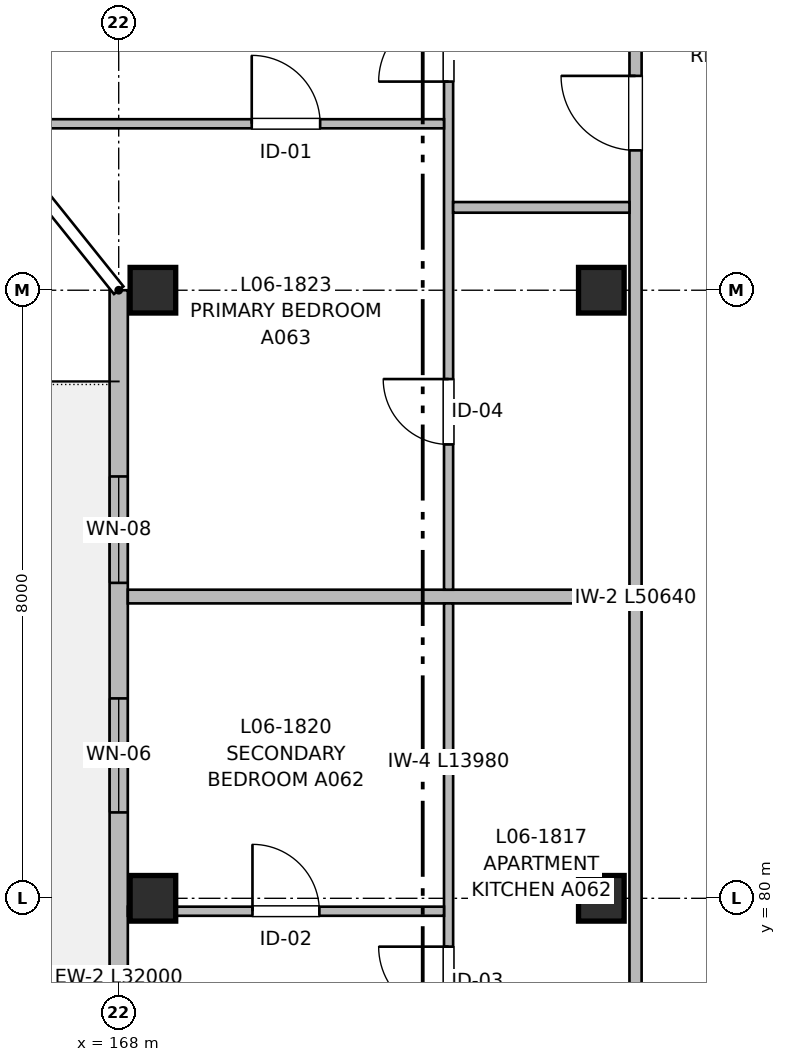
"""IFC4 building model, lengths in metres.
Left out: names, types, materials, properties, quantities, classifications, styles, units other than length and angle.
Written with IfcOpenShell. Run it as: python <this file> out.ifc"""

import sys

from ifc_helpers import new_model, si_unit, direction, frame, frame_2d, origin, origin_2d, place, context, subcontext, project, spatial, rectangle, extrude, element, fill, save


model = new_model("IFC4")
c1 = context("Model", 3, precision=1e-05, world=origin(), true_north=direction((0.0, 1.0)))
c2 = subcontext(c1, "Body", "Model", "MODEL_VIEW")
j1 = project(units=[si_unit("LENGTHUNIT", "METRE"), si_unit("PLANEANGLEUNIT", "RADIAN")], contexts=[c1])
p1 = place(None, origin())
s1 = spatial("IfcSite", under=j1, at=p1, CompositionType="ELEMENT")
p2 = place(p1, origin())
s2 = spatial("IfcBuilding", under=s1, at=p2, CompositionType="ELEMENT")
p3 = place(p2, frame((0.0, 0.0, 20.16)))
s3 = spatial("IfcBuildingStorey", under=s2, at=p3, CompositionType="ELEMENT", Elevation=20.16)
for number, where, z_axis, x_axis in (
    (1, (168.45, 80.0, 0.0), (0.0, 0.0, 1.0), (1.0, 0.0, 0.0)),
    (2, (168.45, 88.0, 0.0), (0.0, 0.0, 1.0), (1.0, 0.0, 0.0)),
    (3, (174.35, 80.0, 0.0), (0.0, 0.0, 1.0), (1.0, 0.0, 0.0)),
    (4, (174.35, 88.0, 0.0), (0.0, 0.0, 1.0), (1.0, 0.0, 0.0)),
):
    element("IfcColumn", number, at=place(p3, frame(where, z_axis=z_axis, x_axis=x_axis)), inside=s3, PredefinedType="COLUMN", context=c2, shape_type="SweptSolid", body=[
        extrude(rectangle(XDim=0.6, YDim=0.6, at=origin_2d()), origin(), (0.0, 0.0, 1.0), 3.2),
    ])
p4 = place(p3, frame((168.0, 56.0, 0.0), z_axis=(0.0, 0.0, 1.0), x_axis=(0.0, 1.0, 0.0)))
e5 = element("IfcWall", 5, at=p4, inside=s3, PredefinedType="SOLIDWALL", context=c2, shape_type="SweptSolid", body=[
    extrude(rectangle(XDim=32.0, YDim=0.24, at=frame_2d((16.0, 0.0))), origin(), (0.0, 0.0, 1.0), 2.98),
])
p5 = place(p4, frame((3.4, 0.0, 0.0)))
e6 = element("IfcOpeningElement", 6, at=p5, cuts=e5, PredefinedType="OPENING", context=c2, shape_type="SweptSolid", body=[
    extrude(rectangle(XDim=1.2, YDim=2.2, at=frame_2d((0.6, 1.1))), frame((0.0, 0.13, 0.0), z_axis=(0.0, -1.0, 0.0), x_axis=(1.0, 0.0, 0.0)), (0.0, 0.0, 1.0), 0.26),
])
p6 = place(p4, frame((5.3, 0.0, 0.47)))
e7 = element("IfcOpeningElement", 7, at=p6, cuts=e5, PredefinedType="OPENING", context=c2, shape_type="SweptSolid", body=[
    extrude(rectangle(XDim=2.7, YDim=1.75, at=frame_2d((1.35, 0.875))), frame((0.0, 0.13, 0.0), z_axis=(0.0, -1.0, 0.0), x_axis=(1.0, 0.0, 0.0)), (0.0, 0.0, 1.0), 0.26),
])
p7 = place(p4, frame((11.25, 0.0, 0.82)))
e8 = element("IfcOpeningElement", 8, at=p7, cuts=e5, PredefinedType="OPENING", context=c2, shape_type="SweptSolid", body=[
    extrude(rectangle(XDim=1.5, YDim=1.4, at=frame_2d((0.75, 0.7))), frame((0.0, 0.13, 0.0), z_axis=(0.0, -1.0, 0.0), x_axis=(1.0, 0.0, 0.0)), (0.0, 0.0, 1.0), 0.26),
])
p8 = place(p4, frame((19.225, 0.0, 0.82)))
e9 = element("IfcOpeningElement", 9, at=p8, cuts=e5, PredefinedType="OPENING", context=c2, shape_type="SweptSolid", body=[
    extrude(rectangle(XDim=1.55, YDim=1.4, at=frame_2d((0.775, 0.7))), frame((0.0, 0.13, 0.0), z_axis=(0.0, -1.0, 0.0), x_axis=(1.0, 0.0, 0.0)), (0.0, 0.0, 1.0), 0.26),
])
p9 = place(p4, frame((28.15, 0.0, 0.87)))
e10 = element("IfcOpeningElement", 10, at=p9, cuts=e5, PredefinedType="OPENING", context=c2, shape_type="SweptSolid", body=[
    extrude(rectangle(XDim=1.4, YDim=1.35, at=frame_2d((0.7, 0.675))), frame((0.0, 0.13, 0.0), z_axis=(0.0, -1.0, 0.0), x_axis=(1.0, 0.0, 0.0)), (0.0, 0.0, 1.0), 0.26),
])
p10 = place(p4, frame((16.408, 0.0, 0.82)))
e11 = element("IfcOpeningElement", 11, at=p10, cuts=e5, PredefinedType="OPENING", context=c2, shape_type="SweptSolid", body=[
    extrude(rectangle(XDim=1.5, YDim=1.4, at=frame_2d((0.75, 0.7))), frame((0.0, 0.13, 0.0), z_axis=(0.0, -1.0, 0.0), x_axis=(1.0, 0.0, 0.0)), (0.0, 0.0, 1.0), 0.26),
])
p11 = place(p4, frame((25.13, 0.0, 0.82)))
e12 = element("IfcOpeningElement", 12, at=p11, cuts=e5, PredefinedType="OPENING", context=c2, shape_type="SweptSolid", body=[
    extrude(rectangle(XDim=1.5, YDim=1.4, at=frame_2d((0.75, 0.7))), frame((0.0, 0.13, 0.0), z_axis=(0.0, -1.0, 0.0), x_axis=(1.0, 0.0, 0.0)), (0.0, 0.0, 1.0), 0.26),
])
p12 = place(p3, frame((174.8, 56.16, 0.0), z_axis=(0.0, 0.0, 1.0), x_axis=(0.0, 1.0, 0.0)))
e13 = element("IfcWall", 13, at=p12, inside=s3, PredefinedType="PARTITIONING", context=c2, shape_type="SweptSolid", body=[
    extrude(rectangle(XDim=50.64, YDim=0.16, at=frame_2d((25.32, 0.0))), origin(), (0.0, 0.0, 1.0), 2.935),
])
p13 = place(p12, frame((5.63, 0.0, 0.0)))
e14 = element("IfcOpeningElement", 14, at=p13, cuts=e13, PredefinedType="OPENING", context=c2, shape_type="SweptSolid", body=[
    extrude(rectangle(XDim=1.5, YDim=2.2, at=frame_2d((0.75, 1.1))), frame((0.0, 0.09, 0.0), z_axis=(0.0, -1.0, 0.0), x_axis=(1.0, 0.0, 0.0)), (0.0, 0.0, 1.0), 0.18),
])
p14 = place(p12, frame((20.92, 0.0, 0.0)))
e15 = element("IfcOpeningElement", 15, at=p14, cuts=e13, PredefinedType="OPENING", context=c2, shape_type="SweptSolid", body=[
    extrude(rectangle(XDim=0.98, YDim=2.15, at=frame_2d((0.49, 1.075))), frame((0.0, 0.09, 0.0), z_axis=(0.0, -1.0, 0.0), x_axis=(1.0, 0.0, 0.0)), (0.0, 0.0, 1.0), 0.18),
])
p15 = place(p12, frame((33.68, 0.0, 0.0)))
e16 = element("IfcOpeningElement", 16, at=p15, cuts=e13, PredefinedType="OPENING", context=c2, shape_type="SweptSolid", body=[
    extrude(rectangle(XDim=0.98, YDim=2.15, at=frame_2d((0.49, 1.075))), frame((0.0, 0.09, 0.0), z_axis=(0.0, -1.0, 0.0), x_axis=(1.0, 0.0, 0.0)), (0.0, 0.0, 1.0), 0.18),
])
p16 = place(p12, frame((45.08, 0.0, 0.0)))
e17 = element("IfcOpeningElement", 17, at=p16, cuts=e13, PredefinedType="OPENING", context=c2, shape_type="SweptSolid", body=[
    extrude(rectangle(XDim=0.98, YDim=2.15, at=frame_2d((0.49, 1.075))), frame((0.0, 0.09, 0.0), z_axis=(0.0, -1.0, 0.0), x_axis=(1.0, 0.0, 0.0)), (0.0, 0.0, 1.0), 0.18),
])
p17 = place(p3, frame((168.12, 83.97, 0.0), z_axis=(0.0, 0.0, 1.0), x_axis=(1.0, 0.0, 0.0)))
e18 = element("IfcWall", 18, at=p17, inside=s3, PredefinedType="PARTITIONING", context=c2, shape_type="SweptSolid", body=[
    extrude(rectangle(XDim=6.6, YDim=0.18, at=frame_2d((3.3, 0.0))), origin(), (0.0, 0.0, 1.0), 2.935),
])
p18 = place(p3, frame((172.34, 69.9, 0.0), z_axis=(0.0, 0.0, 1.0), x_axis=(0.0, 1.0, 0.0)))
e19 = element("IfcWall", 19, at=p18, inside=s3, PredefinedType="PARTITIONING", context=c2, shape_type="SweptSolid", body=[
    extrude(rectangle(XDim=13.98, YDim=0.12, at=frame_2d((6.99, 0.0))), origin(), (0.0, 0.0, 1.0), 2.935),
])
p19 = place(p18, frame((2.443, 0.0, 0.0)))
e20 = element("IfcOpeningElement", 20, at=p19, cuts=e19, PredefinedType="OPENING", context=c2, shape_type="SweptSolid", body=[
    extrude(rectangle(XDim=0.86, YDim=2.1, at=frame_2d((0.43, 1.05))), frame((0.0, 0.07, 0.0), z_axis=(0.0, -1.0, 0.0), x_axis=(1.0, 0.0, 0.0)), (0.0, 0.0, 1.0), 0.14),
])
p20 = place(p18, frame((8.544, 0.0, 0.0)))
e21 = element("IfcOpeningElement", 21, at=p20, cuts=e19, PredefinedType="OPENING", context=c2, shape_type="SweptSolid", body=[
    extrude(rectangle(XDim=0.92, YDim=2.1, at=frame_2d((0.46, 1.05))), frame((0.0, 0.07, 0.0), z_axis=(0.0, -1.0, 0.0), x_axis=(1.0, 0.0, 0.0)), (0.0, 0.0, 1.0), 0.14),
])
p21 = place(p3, frame((168.12, 79.83, 0.0), z_axis=(0.0, 0.0, 1.0), x_axis=(1.0, 0.0, 0.0)))
e22 = element("IfcWall", 22, at=p21, inside=s3, PredefinedType="PARTITIONING", context=c2, shape_type="SweptSolid", body=[
    extrude(rectangle(XDim=4.16, YDim=0.12, at=frame_2d((2.08, 0.0))), origin(), (0.0, 0.0, 1.0), 2.53),
])
p22 = place(p21, frame((1.64, 0.0, 0.0)))
e23 = element("IfcOpeningElement", 23, at=p22, cuts=e22, PredefinedType="OPENING", context=c2, shape_type="SweptSolid", body=[
    extrude(rectangle(XDim=0.88, YDim=2.1, at=frame_2d((0.44, 1.05))), frame((0.0, 0.07, 0.0), z_axis=(0.0, -1.0, 0.0), x_axis=(1.0, 0.0, 0.0)), (0.0, 0.0, 1.0), 0.14),
])
p23 = place(p3, frame((172.34, 84.06, 0.0), z_axis=(0.0, 0.0, 1.0), x_axis=(0.0, 1.0, 0.0)))
e24 = element("IfcWall", 24, at=p23, inside=s3, PredefinedType="PARTITIONING", context=c2, shape_type="SweptSolid", body=[
    extrude(rectangle(XDim=10.94, YDim=0.12, at=frame_2d((5.47, 0.0))), origin(), (0.0, 0.0, 1.0), 2.935),
])
p24 = place(p23, frame((1.911, 0.0, 0.0)))
e25 = element("IfcOpeningElement", 25, at=p24, cuts=e24, PredefinedType="OPENING", context=c2, shape_type="SweptSolid", body=[
    extrude(rectangle(XDim=0.86, YDim=2.1, at=frame_2d((0.43, 1.05))), frame((0.0, 0.07, 0.0), z_axis=(0.0, -1.0, 0.0), x_axis=(1.0, 0.0, 0.0)), (0.0, 0.0, 1.0), 0.14),
])
p25 = place(p23, frame((6.685, 0.0, 0.0)))
e26 = element("IfcOpeningElement", 26, at=p25, cuts=e24, PredefinedType="OPENING", context=c2, shape_type="SweptSolid", body=[
    extrude(rectangle(XDim=0.92, YDim=2.1, at=frame_2d((0.46, 1.05))), frame((0.0, 0.07, 0.0), z_axis=(0.0, -1.0, 0.0), x_axis=(1.0, 0.0, 0.0)), (0.0, 0.0, 1.0), 0.14),
])
p26 = place(p3, frame((172.4, 89.09, 0.0), z_axis=(0.0, 0.0, 1.0), x_axis=(1.0, 0.0, 0.0)))
e27 = element("IfcWall", 27, at=p26, inside=s3, PredefinedType="PARTITIONING", context=c2, shape_type="SweptSolid", body=[
    extrude(rectangle(XDim=2.32, YDim=0.14, at=frame_2d((1.16, 0.0))), origin(), (0.0, 0.0, 1.0), 2.935),
])
p27 = place(p3, frame((166.294, 90.19, 0.0), z_axis=(0.0, 0.0, 1.0), x_axis=(1.0, 0.0, 0.0)))
e28 = element("IfcWall", 28, at=p27, inside=s3, PredefinedType="PARTITIONING", context=c2, shape_type="SweptSolid", body=[
    extrude(rectangle(XDim=5.986, YDim=0.12, at=frame_2d((2.993, 0.0))), origin(), (0.0, 0.0, 1.0), 2.935),
])
p28 = place(p27, frame((3.456, 0.0, 0.0)))
e29 = element("IfcOpeningElement", 29, at=p28, cuts=e28, PredefinedType="OPENING", context=c2, shape_type="SweptSolid", body=[
    extrude(rectangle(XDim=0.9, YDim=2.1, at=frame_2d((0.45, 1.05))), frame((0.0, 0.07, 0.0), z_axis=(0.0, -1.0, 0.0), x_axis=(1.0, 0.0, 0.0)), (0.0, 0.0, 1.0), 0.14),
])
p29 = place(p9, origin())
e30 = element("IfcWindow", 30, at=p29, inside=s3, PartitioningType="SINGLE_PANEL", PredefinedType="WINDOW", context=c2, shape_type="SweptSolid", body=[
    extrude(rectangle(XDim=1.4, YDim=1.35, at=frame_2d((0.7, 0.675))), frame((0.0, 0.03, 0.0), z_axis=(0.0, -1.0, 0.0), x_axis=(1.0, 0.0, 0.0)), (0.0, 0.0, 1.0), 0.06),
])
fill(e10, e30)
p30 = place(p20, origin())
e31 = element("IfcDoor", 31, at=p30, inside=s3, OperationType="SINGLE_SWING_RIGHT", PredefinedType="DOOR", context=c2, shape_type="SweptSolid", body=[
    extrude(rectangle(XDim=0.92, YDim=2.1, at=frame_2d((0.46, 1.05))), frame((0.0, 0.025, 0.0), z_axis=(0.0, -1.0, 0.0), x_axis=(1.0, 0.0, 0.0)), (0.0, 0.0, 1.0), 0.05),
])
fill(e21, e31)
p31 = place(p22, origin())
e32 = element("IfcDoor", 32, at=p31, inside=s3, OperationType="SINGLE_SWING_LEFT", PredefinedType="DOOR", context=c2, shape_type="SweptSolid", body=[
    extrude(rectangle(XDim=0.88, YDim=2.1, at=frame_2d((0.44, 1.05))), frame((0.0, 0.025, 0.0), z_axis=(0.0, -1.0, 0.0), x_axis=(1.0, 0.0, 0.0)), (0.0, 0.0, 1.0), 0.05),
])
fill(e23, e32)
p32 = place(p24, origin())
e33 = element("IfcDoor", 33, at=p32, inside=s3, OperationType="SINGLE_SWING_RIGHT", PredefinedType="DOOR", context=c2, shape_type="SweptSolid", body=[
    extrude(rectangle(XDim=0.86, YDim=2.1, at=frame_2d((0.43, 1.05))), frame((0.0, 0.025, 0.0), z_axis=(0.0, -1.0, 0.0), x_axis=(1.0, 0.0, 0.0)), (0.0, 0.0, 1.0), 0.05),
])
fill(e25, e33)
p33 = place(p25, origin())
e34 = element("IfcDoor", 34, at=p33, inside=s3, OperationType="SINGLE_SWING_LEFT", PredefinedType="DOOR", context=c2, shape_type="SweptSolid", body=[
    extrude(rectangle(XDim=0.92, YDim=2.1, at=frame_2d((0.46, 1.05))), frame((0.0, 0.025, 0.0), z_axis=(0.0, -1.0, 0.0), x_axis=(1.0, 0.0, 0.0)), (0.0, 0.0, 1.0), 0.05),
])
fill(e26, e34)
p34 = place(p15, origin())
e35 = element("IfcDoor", 35, at=p34, inside=s3, OperationType="SINGLE_SWING_RIGHT", PredefinedType="DOOR", context=c2, shape_type="SweptSolid", body=[
    extrude(rectangle(XDim=0.98, YDim=2.15, at=frame_2d((0.49, 1.075))), frame((0.0, 0.025, 0.0), z_axis=(0.0, -1.0, 0.0), x_axis=(1.0, 0.0, 0.0)), (0.0, 0.0, 1.0), 0.05),
])
fill(e16, e35)
p35 = place(p28, origin())
e36 = element("IfcDoor", 36, at=p35, inside=s3, OperationType="SINGLE_SWING_LEFT", PredefinedType="DOOR", context=c2, shape_type="SweptSolid", body=[
    extrude(rectangle(XDim=0.9, YDim=2.1, at=frame_2d((0.45, 1.05))), frame((0.0, 0.025, 0.0), z_axis=(0.0, -1.0, 0.0), x_axis=(1.0, 0.0, 0.0)), (0.0, 0.0, 1.0), 0.05),
])
fill(e29, e36)
p36 = place(p11, origin())
e37 = element("IfcWindow", 37, at=p36, inside=s3, PartitioningType="SINGLE_PANEL", PredefinedType="WINDOW", context=c2, shape_type="SweptSolid", body=[
    extrude(rectangle(XDim=1.5, YDim=1.4, at=frame_2d((0.75, 0.7))), frame((0.0, 0.03, 0.0), z_axis=(0.0, -1.0, 0.0), x_axis=(1.0, 0.0, 0.0)), (0.0, 0.0, 1.0), 0.06),
])
fill(e12, e37)
save(model, sys.argv[1])
